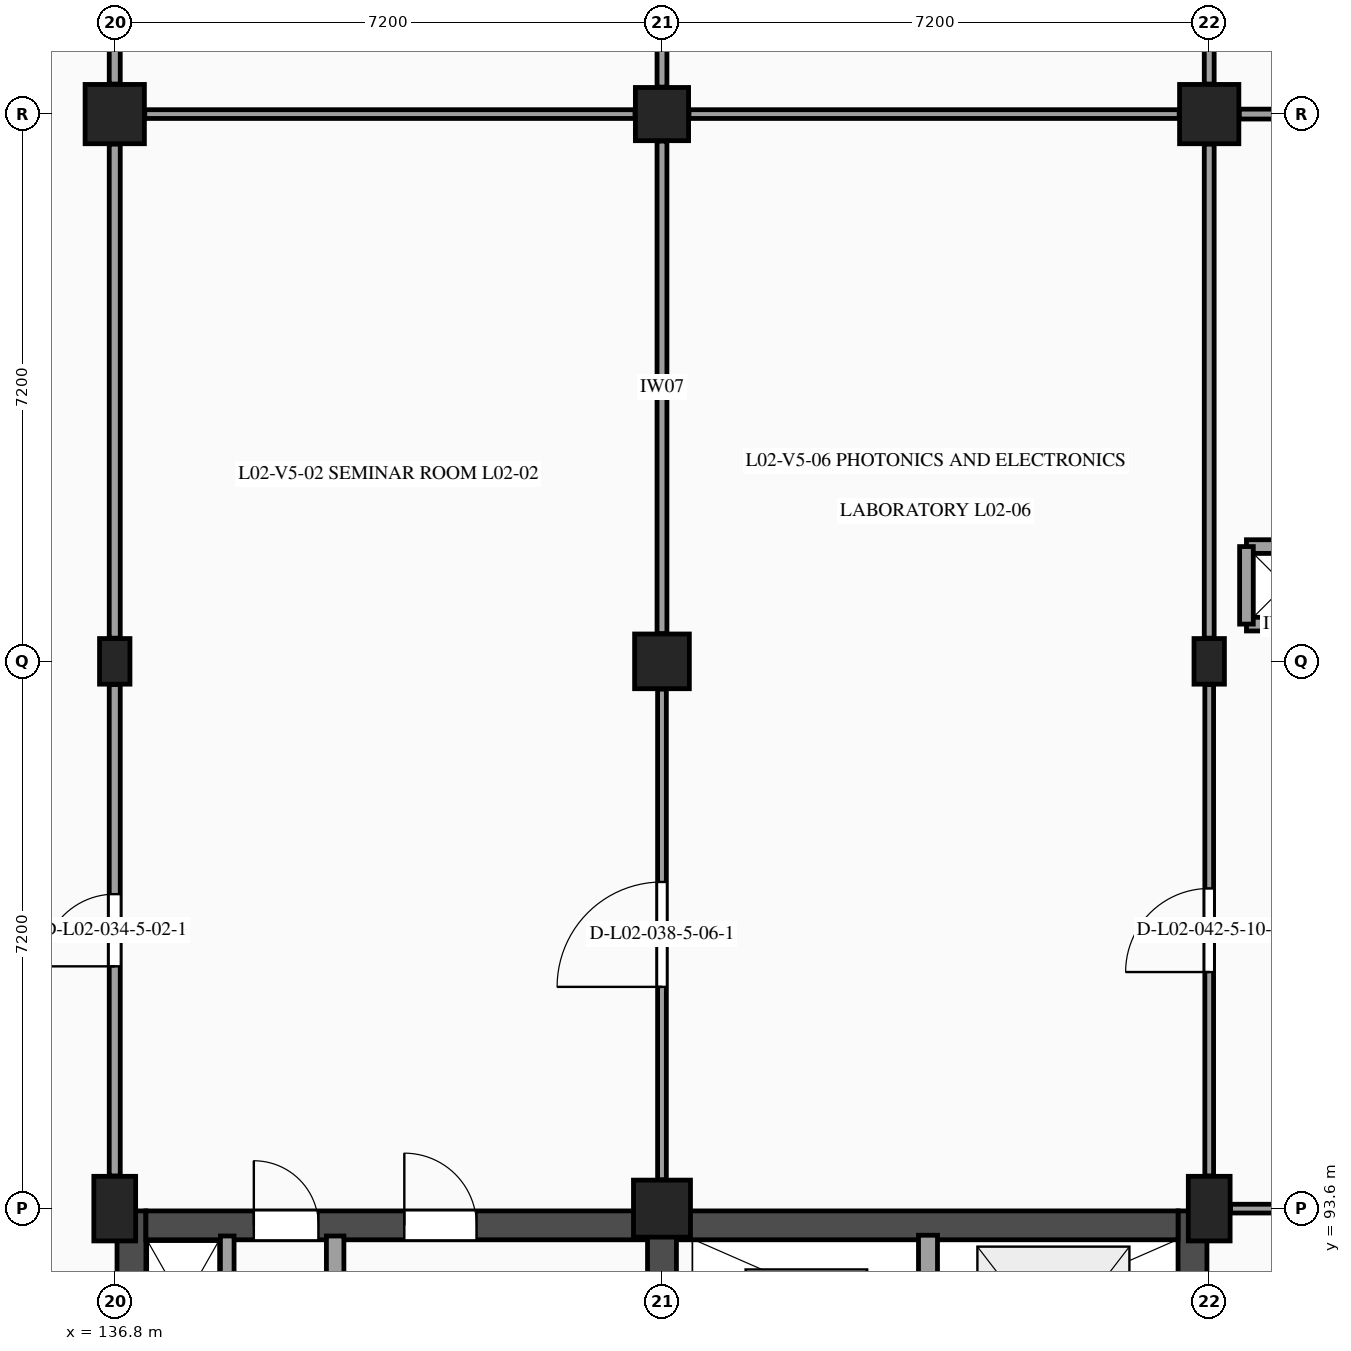
"""IFC4 building model, lengths in metres.
Left out: names, types, materials, properties, quantities, classifications, styles, units other than length and angle.
Written with IfcOpenShell. Run it as: python <this file> out.ifc"""

import sys

from ifc_helpers import new_model, si_unit, direction, frame, frame_2d, origin, origin_2d, place, context, subcontext, project, spatial, rectangle, extrude, element, fill, save


model = new_model("IFC4")
c1 = context("Model", 3, precision=1e-05, world=origin(), true_north=direction((0.0, 1.0)))
c2 = subcontext(c1, "Body", "Model", "MODEL_VIEW")
j1 = project(units=[si_unit("LENGTHUNIT", "METRE"), si_unit("PLANEANGLEUNIT", "RADIAN")], contexts=[c1])
p1 = place(None, origin())
s1 = spatial("IfcSite", under=j1, at=p1, CompositionType="ELEMENT")
p2 = place(p1, origin())
s2 = spatial("IfcBuilding", under=s1, at=p2, CompositionType="ELEMENT")
p3 = place(p2, frame((0.0, 0.0, 9.9)))
s3 = spatial("IfcBuildingStorey", under=s2, at=p3, CompositionType="ELEMENT", Elevation=9.9)
p4 = place(p3, frame((136.8, 93.6, 0.0), z_axis=(0.0, 0.0, 1.0), x_axis=(1.0, 0.0, 0.0)))
e1 = element("IfcColumn", 1, at=p4, inside=s3, PredefinedType="COLUMN", context=c2, shape_type="SweptSolid", body=[
    extrude(rectangle(XDim=0.55, YDim=0.85, at=origin_2d()), origin(), (0.0, 0.0, 1.0), 4.5),
])
p5 = place(p3, frame((136.8, 100.8, 0.0), z_axis=(0.0, 0.0, 1.0), x_axis=(1.0, 0.0, 0.0)))
e2 = element("IfcColumn", 2, at=p5, inside=s3, PredefinedType="PILASTER", context=c2, shape_type="SweptSolid", body=[
    extrude(rectangle(XDim=0.4, YDim=0.6, at=origin_2d()), origin(), (0.0, 0.0, 1.0), 4.5),
])
p6 = place(p3, frame((136.8, 108.0, 0.0), z_axis=(0.0, 0.0, 1.0), x_axis=(1.0, 0.0, 0.0)))
e3 = element("IfcColumn", 3, at=p6, inside=s3, PredefinedType="COLUMN", context=c2, shape_type="SweptSolid", body=[
    extrude(rectangle(XDim=0.78, YDim=0.78, at=origin_2d()), origin(), (0.0, 0.0, 1.0), 4.5),
])
p7 = place(p3, frame((144.0, 93.6, 0.0), z_axis=(0.0, 0.0, 1.0), x_axis=(1.0, 0.0, 0.0)))
e4 = element("IfcColumn", 4, at=p7, inside=s3, PredefinedType="COLUMN", context=c2, shape_type="SweptSolid", body=[
    extrude(rectangle(XDim=0.75, YDim=0.75, at=origin_2d()), origin(), (0.0, 0.0, 1.0), 4.5),
])
p8 = place(p3, frame((144.0, 100.8, 0.0), z_axis=(0.0, 0.0, 1.0), x_axis=(1.0, 0.0, 0.0)))
e5 = element("IfcColumn", 5, at=p8, inside=s3, PredefinedType="COLUMN", context=c2, shape_type="SweptSolid", body=[
    extrude(rectangle(XDim=0.72, YDim=0.72, at=origin_2d()), origin(), (0.0, 0.0, 1.0), 4.5),
])
p9 = place(p3, frame((144.0, 108.0, 0.0), z_axis=(0.0, 0.0, 1.0), x_axis=(1.0, 0.0, 0.0)))
e6 = element("IfcColumn", 6, at=p9, inside=s3, PredefinedType="COLUMN", context=c2, shape_type="SweptSolid", body=[
    extrude(rectangle(XDim=0.7, YDim=0.7, at=origin_2d()), origin(), (0.0, 0.0, 1.0), 4.5),
])
p10 = place(p3, frame((151.2, 93.6, 0.0), z_axis=(0.0, 0.0, 1.0), x_axis=(1.0, 0.0, 0.0)))
e7 = element("IfcColumn", 7, at=p10, inside=s3, PredefinedType="COLUMN", context=c2, shape_type="SweptSolid", body=[
    extrude(rectangle(XDim=0.55, YDim=0.85, at=origin_2d()), origin(), (0.0, 0.0, 1.0), 4.5),
])
p11 = place(p3, frame((151.2, 100.8, 0.0), z_axis=(0.0, 0.0, 1.0), x_axis=(1.0, 0.0, 0.0)))
e8 = element("IfcColumn", 8, at=p11, inside=s3, PredefinedType="PILASTER", context=c2, shape_type="SweptSolid", body=[
    extrude(rectangle(XDim=0.4, YDim=0.6, at=origin_2d()), origin(), (0.0, 0.0, 1.0), 4.5),
])
p12 = place(p3, frame((151.2, 108.0, 0.0), z_axis=(0.0, 0.0, 1.0), x_axis=(1.0, 0.0, 0.0)))
e9 = element("IfcColumn", 9, at=p12, inside=s3, PredefinedType="COLUMN", context=c2, shape_type="SweptSolid", body=[
    extrude(rectangle(XDim=0.78, YDim=0.78, at=origin_2d()), origin(), (0.0, 0.0, 1.0), 4.5),
])
p13 = place(p3, frame((137.02, 93.57, 0.0), z_axis=(0.0, 0.0, 1.0), x_axis=(0.0, -1.0, 0.0)))
e10 = element("IfcWall", 10, at=p13, inside=s3, PredefinedType="SHEAR", context=c2, shape_type="SweptSolid", body=[
    extrude(rectangle(XDim=7.14, YDim=0.38, at=frame_2d((3.57, 0.0))), origin(), (0.0, 0.0, 1.0), 4.225),
])
p14 = place(p3, frame((137.21, 93.38, 0.0), z_axis=(0.0, 0.0, 1.0), x_axis=(1.0, 0.0, 0.0)))
e11 = element("IfcWall", 11, at=p14, inside=s3, PredefinedType="SHEAR", context=c2, shape_type="SweptSolid", body=[
    extrude(rectangle(XDim=6.6, YDim=0.38, at=frame_2d((3.3, 0.0))), origin(), (0.0, 0.0, 1.0), 4.225),
])
p15 = place(p14, frame((1.42, 0.0, 0.0)))
e12 = element("IfcOpeningElement", 12, at=p15, cuts=e11, PredefinedType="OPENING", context=c2, shape_type="SweptSolid", body=[
    extrude(rectangle(XDim=0.85, YDim=2.1, at=frame_2d((0.425, 1.05))), frame((0.0, 0.2, 0.0), z_axis=(0.0, -1.0, 0.0), x_axis=(1.0, 0.0, 0.0)), (0.0, 0.0, 1.0), 0.4),
])
p16 = place(p14, frame((3.4, 0.0, 0.0)))
e13 = element("IfcOpeningElement", 13, at=p16, cuts=e11, PredefinedType="OPENING", context=c2, shape_type="SweptSolid", body=[
    extrude(rectangle(XDim=0.95, YDim=2.15, at=frame_2d((0.475, 1.075))), frame((0.0, 0.2, 0.0), z_axis=(0.0, -1.0, 0.0), x_axis=(1.0, 0.0, 0.0)), (0.0, 0.0, 1.0), 0.4),
])
p17 = place(p3, frame((139.7, 91.5, 0.0), z_axis=(0.0, 0.0, 1.0), x_axis=(0.0, 1.0, 0.0)))
e14 = element("IfcWall", 14, at=p17, inside=s3, PredefinedType="PARTITIONING", context=c2, shape_type="SweptSolid", body=[
    extrude(rectangle(XDim=1.74, YDim=0.23, at=frame_2d((0.87, 0.0))), origin(), (0.0, 0.0, 1.0), 4.225),
])
p18 = place(p3, frame((138.28, 91.48, 0.0), z_axis=(0.0, 0.0, 1.0), x_axis=(0.0, 1.0, 0.0)))
e15 = element("IfcWall", 15, at=p18, inside=s3, PredefinedType="PARTITIONING", context=c2, shape_type="SweptSolid", body=[
    extrude(rectangle(XDim=1.76, YDim=0.18, at=frame_2d((0.88, 0.0))), origin(), (0.0, 0.0, 1.0), 4.225),
])
p19 = place(p3, frame((144.0, 86.43, 0.0), z_axis=(0.0, 0.0, 1.0), x_axis=(0.0, 1.0, 0.0)))
e16 = element("IfcWall", 16, at=p19, inside=s3, PredefinedType="SHEAR", context=c2, shape_type="SweptSolid", body=[
    extrude(rectangle(XDim=7.14, YDim=0.38, at=frame_2d((3.57, 0.0))), origin(), (0.0, 0.0, 1.0), 4.225),
])
p20 = place(p19, frame((1.4, 0.0, 0.0)))
e17 = element("IfcOpeningElement", 17, at=p20, cuts=e16, PredefinedType="OPENING", context=c2, shape_type="SweptSolid", body=[
    extrude(rectangle(XDim=1.8, YDim=2.2, at=frame_2d((0.9, 1.1))), frame((0.0, 0.2, 0.0), z_axis=(0.0, -1.0, 0.0), x_axis=(1.0, 0.0, 0.0)), (0.0, 0.0, 1.0), 0.4),
])
p21 = place(p3, frame((150.98, 86.43, 0.0), z_axis=(0.0, 0.0, 1.0), x_axis=(0.0, 1.0, 0.0)))
e18 = element("IfcWall", 18, at=p21, inside=s3, PredefinedType="SHEAR", context=c2, shape_type="SweptSolid", body=[
    extrude(rectangle(XDim=7.14, YDim=0.38, at=frame_2d((3.57, 0.0))), origin(), (0.0, 0.0, 1.0), 4.225),
])
p22 = place(p3, frame((144.19, 93.38, 0.0), z_axis=(0.0, 0.0, 1.0), x_axis=(1.0, 0.0, 0.0)))
e19 = element("IfcWall", 19, at=p22, inside=s3, PredefinedType="SHEAR", context=c2, shape_type="SweptSolid", body=[
    extrude(rectangle(XDim=6.6, YDim=0.38, at=frame_2d((3.3, 0.0))), origin(), (0.0, 0.0, 1.0), 4.225),
])
p23 = place(p3, frame((147.5, 90.38, 0.0), z_axis=(0.0, 0.0, 1.0), x_axis=(0.0, 1.0, 0.0)))
e20 = element("IfcWall", 20, at=p23, inside=s3, PredefinedType="PARTITIONING", context=c2, shape_type="SweptSolid", body=[
    extrude(rectangle(XDim=2.87, YDim=0.25, at=frame_2d((1.435, 0.0))), origin(), (0.0, 0.0, 1.0), 4.225),
])
for number, where, z_axis, x_axis in (
    (21, (151.69, 101.29, 0.0), (0.0, 0.0, 1.0), (1.0, 0.0, 0.0)),
    (22, (152.71, 102.31, 0.0), (0.0, 0.0, 1.0), (-1.0, 0.0, 0.0)),
    (23, (151.69, 102.31, 0.0), (0.0, 0.0, 1.0), (0.0, -1.0, 0.0)),
):
    element("IfcWall", number, at=place(p3, frame(where, z_axis=z_axis, x_axis=x_axis)), inside=s3, PredefinedType="PARTITIONING", context=c2, shape_type="SweptSolid", body=[
        extrude(rectangle(XDim=1.02, YDim=0.18, at=frame_2d((0.51, 0.0))), origin(), (0.0, 0.0, 1.0), 4.225),
    ])
p24 = place(p3, frame((136.8, 94.03, 0.0), z_axis=(0.0, 0.0, 1.0), x_axis=(0.0, 1.0, 0.0)))
e24 = element("IfcWall", 24, at=p24, inside=s3, PredefinedType="PARTITIONING", context=c2, shape_type="SweptSolid", body=[
    extrude(rectangle(XDim=6.465, YDim=0.145, at=frame_2d((3.232, 0.0))), origin(), (0.0, 0.0, 1.0), 3.54),
])
p25 = place(p24, frame((2.758, 0.0, 0.0)))
e25 = element("IfcOpeningElement", 25, at=p25, cuts=e24, PredefinedType="OPENING", context=c2, shape_type="SweptSolid", body=[
    extrude(rectangle(XDim=0.95, YDim=2.15, at=frame_2d((0.475, 1.075))), frame((0.0, 0.083, 0.0), z_axis=(0.0, -1.0, 0.0), x_axis=(1.0, 0.0, 0.0)), (0.0, 0.0, 1.0), 0.165),
])
p26 = place(p3, frame((136.8, 101.105, 0.0), z_axis=(0.0, 0.0, 1.0), x_axis=(0.0, 1.0, 0.0)))
e26 = element("IfcWall", 26, at=p26, inside=s3, PredefinedType="PARTITIONING", context=c2, shape_type="SweptSolid", body=[
    extrude(rectangle(XDim=6.5, YDim=0.145, at=frame_2d((3.25, 0.0))), origin(), (0.0, 0.0, 1.0), 3.54),
])
p27 = place(p3, frame((136.8, 108.395, 0.0), z_axis=(0.0, 0.0, 1.0), x_axis=(0.0, 1.0, 0.0)))
e27 = element("IfcWall", 27, at=p27, inside=s3, PredefinedType="PARTITIONING", context=c2, shape_type="SweptSolid", body=[
    extrude(rectangle(XDim=6.425, YDim=0.145, at=frame_2d((3.212, 0.0))), origin(), (0.0, 0.0, 1.0), 3.535),
])
p28 = place(p27, frame((2.252, 0.0, 0.0)))
e28 = element("IfcOpeningElement", 28, at=p28, cuts=e27, PredefinedType="OPENING", context=c2, shape_type="SweptSolid", body=[
    extrude(rectangle(XDim=1.92, YDim=2.35, at=frame_2d((0.96, 1.175))), frame((0.0, 0.083, 0.0), z_axis=(0.0, -1.0, 0.0), x_axis=(1.0, 0.0, 0.0)), (0.0, 0.0, 1.0), 0.165),
])
p29 = place(p3, frame((144.0, 93.98, 0.0), z_axis=(0.0, 0.0, 1.0), x_axis=(0.0, 1.0, 0.0)))
e29 = element("IfcWall", 29, at=p29, inside=s3, PredefinedType="PARTITIONING", context=c2, shape_type="SweptSolid", body=[
    extrude(rectangle(XDim=6.455, YDim=0.115, at=frame_2d((3.228, 0.0))), origin(), (0.0, 0.0, 1.0), 3.54),
])
p30 = place(p29, frame((2.538, 0.0, 0.0)))
e30 = element("IfcOpeningElement", 30, at=p30, cuts=e29, PredefinedType="OPENING", context=c2, shape_type="SweptSolid", body=[
    extrude(rectangle(XDim=1.38, YDim=2.22, at=frame_2d((0.69, 1.11))), frame((0.0, 0.067, 0.0), z_axis=(0.0, -1.0, 0.0), x_axis=(1.0, 0.0, 0.0)), (0.0, 0.0, 1.0), 0.135),
])
p31 = place(p3, frame((144.0, 101.165, 0.0), z_axis=(0.0, 0.0, 1.0), x_axis=(0.0, 1.0, 0.0)))
e31 = element("IfcWall", 31, at=p31, inside=s3, PredefinedType="PARTITIONING", context=c2, shape_type="SweptSolid", body=[
    extrude(rectangle(XDim=6.48, YDim=0.13, at=frame_2d((3.24, 0.0))), origin(), (0.0, 0.0, 1.0), 3.54),
])
p32 = place(p3, frame((137.195, 108.0, 0.0), z_axis=(0.0, 0.0, 1.0), x_axis=(1.0, 0.0, 0.0)))
e32 = element("IfcWall", 32, at=p32, inside=s3, PredefinedType="PARTITIONING", context=c2, shape_type="SweptSolid", body=[
    extrude(rectangle(XDim=6.45, YDim=0.115, at=frame_2d((3.225, 0.0))), origin(), (0.0, 0.0, 1.0), 3.475),
])
p33 = place(p3, frame((144.0, 108.355, 0.0), z_axis=(0.0, 0.0, 1.0), x_axis=(0.0, 1.0, 0.0)))
e33 = element("IfcWall", 33, at=p33, inside=s3, PredefinedType="PARTITIONING", context=c2, shape_type="SweptSolid", body=[
    extrude(rectangle(XDim=6.415, YDim=0.13, at=frame_2d((3.208, 0.0))), origin(), (0.0, 0.0, 1.0), 3.535),
])
p34 = place(p33, frame((2.617, 0.0, 0.0)))
e34 = element("IfcOpeningElement", 34, at=p34, cuts=e33, PredefinedType="OPENING", context=c2, shape_type="SweptSolid", body=[
    extrude(rectangle(XDim=1.18, YDim=2.18, at=frame_2d((0.59, 1.09))), frame((0.0, 0.075, 0.0), z_axis=(0.0, -1.0, 0.0), x_axis=(1.0, 0.0, 0.0)), (0.0, 0.0, 1.0), 0.15),
])
p35 = place(p3, frame((151.2, 94.03, 0.0), z_axis=(0.0, 0.0, 1.0), x_axis=(0.0, 1.0, 0.0)))
e35 = element("IfcWall", 35, at=p35, inside=s3, PredefinedType="PARTITIONING", context=c2, shape_type="SweptSolid", body=[
    extrude(rectangle(XDim=6.465, YDim=0.115, at=frame_2d((3.232, 0.0))), origin(), (0.0, 0.0, 1.0), 3.54),
])
p36 = place(p35, frame((2.683, 0.0, 0.0)))
e36 = element("IfcOpeningElement", 36, at=p36, cuts=e35, PredefinedType="OPENING", context=c2, shape_type="SweptSolid", body=[
    extrude(rectangle(XDim=1.1, YDim=2.15, at=frame_2d((0.55, 1.075))), frame((0.0, 0.067, 0.0), z_axis=(0.0, -1.0, 0.0), x_axis=(1.0, 0.0, 0.0)), (0.0, 0.0, 1.0), 0.135),
])
p37 = place(p3, frame((151.2, 101.105, 0.0), z_axis=(0.0, 0.0, 1.0), x_axis=(0.0, 1.0, 0.0)))
e37 = element("IfcWall", 37, at=p37, inside=s3, PredefinedType="PARTITIONING", context=c2, shape_type="SweptSolid", body=[
    extrude(rectangle(XDim=6.5, YDim=0.13, at=frame_2d((3.25, 0.0))), origin(), (0.0, 0.0, 1.0), 3.54),
])
p38 = place(p3, frame((144.355, 108.0, 0.0), z_axis=(0.0, 0.0, 1.0), x_axis=(1.0, 0.0, 0.0)))
e38 = element("IfcWall", 38, at=p38, inside=s3, PredefinedType="PARTITIONING", context=c2, shape_type="SweptSolid", body=[
    extrude(rectangle(XDim=6.45, YDim=0.115, at=frame_2d((3.225, 0.0))), origin(), (0.0, 0.0, 1.0), 3.485),
])
p39 = place(p3, frame((151.2, 108.395, 0.0), z_axis=(0.0, 0.0, 1.0), x_axis=(0.0, 1.0, 0.0)))
e39 = element("IfcWall", 39, at=p39, inside=s3, PredefinedType="PARTITIONING", context=c2, shape_type="SweptSolid", body=[
    extrude(rectangle(XDim=6.425, YDim=0.13, at=frame_2d((3.212, 0.0))), origin(), (0.0, 0.0, 1.0), 3.535),
])
p40 = place(p39, frame((2.738, 0.0, 0.0)))
e40 = element("IfcOpeningElement", 40, at=p40, cuts=e39, PredefinedType="OPENING", context=c2, shape_type="SweptSolid", body=[
    extrude(rectangle(XDim=0.95, YDim=2.15, at=frame_2d((0.475, 1.075))), frame((0.0, 0.075, 0.0), z_axis=(0.0, -1.0, 0.0), x_axis=(1.0, 0.0, 0.0)), (0.0, 0.0, 1.0), 0.15),
])
p41 = place(p3, frame((151.48, 93.6, 0.0), z_axis=(0.0, 0.0, 1.0), x_axis=(1.0, 0.0, 0.0)))
e41 = element("IfcWall", 41, at=p41, inside=s3, PredefinedType="PARTITIONING", context=c2, shape_type="SweptSolid", body=[
    extrude(rectangle(XDim=6.54, YDim=0.115, at=frame_2d((3.27, 0.0))), origin(), (0.0, 0.0, 1.0), 3.5),
])
p42 = place(p3, frame((151.595, 108.0, 0.0), z_axis=(0.0, 0.0, 1.0), x_axis=(1.0, 0.0, 0.0)))
e42 = element("IfcWall", 42, at=p42, inside=s3, PredefinedType="PARTITIONING", context=c2, shape_type="SweptSolid", body=[
    extrude(rectangle(XDim=6.45, YDim=0.13, at=frame_2d((3.225, 0.0))), origin(), (0.0, 0.0, 1.0), 3.5),
])
p43 = place(p15, origin())
e43 = element("IfcDoor", 43, at=p43, inside=s3, OperationType="SINGLE_SWING_LEFT", PredefinedType="DOOR", context=c2, shape_type="SweptSolid", body=[
    extrude(rectangle(XDim=0.85, YDim=2.1, at=frame_2d((0.425, 1.05))), frame((0.0, 0.025, 0.0), z_axis=(0.0, -1.0, 0.0), x_axis=(1.0, 0.0, 0.0)), (0.0, 0.0, 1.0), 0.05),
])
fill(e12, e43)
p44 = place(p16, origin())
e44 = element("IfcDoor", 44, at=p44, inside=s3, OperationType="SINGLE_SWING_LEFT", PredefinedType="DOOR", context=c2, shape_type="SweptSolid", body=[
    extrude(rectangle(XDim=0.95, YDim=2.15, at=frame_2d((0.475, 1.075))), frame((0.0, 0.025, 0.0), z_axis=(0.0, -1.0, 0.0), x_axis=(1.0, 0.0, 0.0)), (0.0, 0.0, 1.0), 0.05),
])
fill(e13, e44)
p45 = place(p25, origin())
e45 = element("IfcDoor", 45, at=p45, inside=s3, OperationType="SINGLE_SWING_LEFT", PredefinedType="DOOR", context=c2, shape_type="SweptSolid", body=[
    extrude(rectangle(XDim=0.95, YDim=2.15, at=frame_2d((0.475, 1.075))), frame((0.0, 0.025, 0.0), z_axis=(0.0, -1.0, 0.0), x_axis=(1.0, 0.0, 0.0)), (0.0, 0.0, 1.0), 0.05),
])
fill(e25, e45)
p46 = place(p30, origin())
e46 = element("IfcDoor", 46, at=p46, inside=s3, OperationType="SINGLE_SWING_LEFT", PredefinedType="DOOR", context=c2, shape_type="SweptSolid", body=[
    extrude(rectangle(XDim=1.38, YDim=2.22, at=frame_2d((0.69, 1.11))), frame((0.0, 0.025, 0.0), z_axis=(0.0, -1.0, 0.0), x_axis=(1.0, 0.0, 0.0)), (0.0, 0.0, 1.0), 0.05),
])
fill(e30, e46)
p47 = place(p36, origin())
e47 = element("IfcDoor", 47, at=p47, inside=s3, OperationType="SINGLE_SWING_LEFT", PredefinedType="DOOR", context=c2, shape_type="SweptSolid", body=[
    extrude(rectangle(XDim=1.1, YDim=2.15, at=frame_2d((0.55, 1.075))), frame((0.0, 0.025, 0.0), z_axis=(0.0, -1.0, 0.0), x_axis=(1.0, 0.0, 0.0)), (0.0, 0.0, 1.0), 0.05),
])
fill(e36, e47)
save(model, sys.argv[1])
